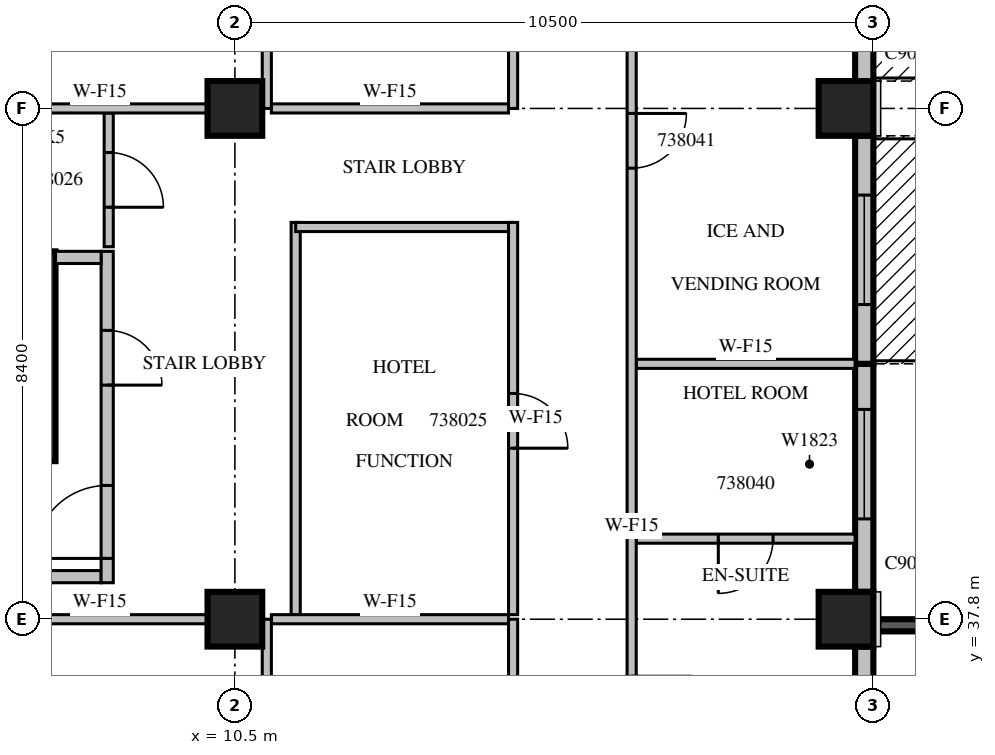
"""IFC4 building model, lengths in metres.
Left out: names, types, materials, properties, quantities, classifications, styles, units other than length and angle.
Written with IfcOpenShell. Run it as: python <this file> out.ifc"""

import sys

from ifc_helpers import new_model, si_unit, direction, frame, frame_2d, origin, origin_2d, place, context, subcontext, project, spatial, rectangle, extrude, source, transform, mapped, element, fill, save


model = new_model("IFC4")
c1 = context("Model", 3, precision=1e-05, world=origin(), true_north=direction((0.0, 1.0)))
c2 = subcontext(c1, "Body", "Model", "MODEL_VIEW")
j1 = project(units=[si_unit("LENGTHUNIT", "METRE"), si_unit("PLANEANGLEUNIT", "RADIAN")], contexts=[c1])
p1 = place(None, origin())
s1 = spatial("IfcSite", under=j1, at=p1, CompositionType="ELEMENT")
p2 = place(p1, origin())
s2 = spatial("IfcBuilding", under=s1, at=p2, CompositionType="ELEMENT")
p3 = place(p2, frame((0.0, 0.0, 177.8)))
s3 = spatial("IfcBuildingStorey", under=s2, at=p3, CompositionType="ELEMENT", Elevation=177.8)
m1 = source(origin(), c2, "Body", "SweptSolid", [
    extrude(rectangle(XDim=0.9, YDim=0.9, at=origin_2d()), origin(), (0.0, 0.0, 1.0), 3.8),
])
for number, where, z_axis, x_axis in (
    (1, (10.5, 37.8, 0.0), (0.0, 0.0, 1.0), (1.0, 0.0, 0.0)),
    (2, (20.55, 37.8, 0.0), (0.0, 0.0, 1.0), (1.0, 0.0, 0.0)),
    (3, (10.5, 46.2, 0.0), (0.0, 0.0, 1.0), (1.0, 0.0, 0.0)),
    (4, (20.55, 46.2, 0.0), (0.0, 0.0, 1.0), (1.0, 0.0, 0.0)),
):
    element("IfcColumn", number, at=place(p3, frame(where, z_axis=z_axis, x_axis=x_axis)), inside=s3, PredefinedType="COLUMN", context=c2, shape_type="MappedRepresentation", body=[
        mapped(m1, transform((0.0, 0.0, 0.0), scale=1.0)),
    ])
m2 = source(origin(), c2, "Body", "SweptSolid", [
    extrude(rectangle(XDim=7.5, YDim=0.3, at=frame_2d((3.75, 0.0))), origin(), (0.0, 0.0, 1.0), 3.4),
])
p4 = place(p3, frame((20.85, 29.85, 0.0), z_axis=(0.0, 0.0, 1.0), x_axis=(0.0, 1.0, 0.0)))
e5 = element("IfcWall", 5, at=p4, inside=s3, PredefinedType="STANDARD", context=c2, shape_type="MappedRepresentation", body=[
    mapped(m2, transform((0.0, 0.0, 0.0), scale=1.0)),
])
m3 = source(origin(), c2, "Body", "SweptSolid", [
    extrude(rectangle(XDim=1.2, YDim=2.3, at=frame_2d((0.6, 1.15))), frame((0.0, 0.16, 0.0), z_axis=(0.0, -1.0, 0.0), x_axis=(1.0, 0.0, 0.0)), (0.0, 0.0, 1.0), 0.32),
])
p5 = place(p4, frame((0.496, 0.0, 0.6)))
e6 = element("IfcOpeningElement", 6, at=p5, cuts=e5, PredefinedType="OPENING", context=c2, shape_type="MappedRepresentation", body=[
    mapped(m3, transform((0.0, 0.0, 0.0), scale=1.0)),
])
m4 = source(origin(), c2, "Body", "SweptSolid", [
    extrude(rectangle(XDim=1.0, YDim=2.1, at=frame_2d((0.5, 1.05))), frame((0.0, 0.16, 0.0), z_axis=(0.0, -1.0, 0.0), x_axis=(1.0, 0.0, 0.0)), (0.0, 0.0, 1.0), 0.32),
])
p6 = place(p4, frame((5.35, 0.0, 0.0)))
e7 = element("IfcOpeningElement", 7, at=p6, cuts=e5, PredefinedType="OPENING", context=c2, shape_type="MappedRepresentation", body=[
    mapped(m4, transform((0.0, 0.0, 0.0), scale=1.0)),
])
p7 = place(p3, frame((20.85, 38.25, 0.0), z_axis=(0.0, 0.0, 1.0), x_axis=(0.0, 1.0, 0.0)))
e8 = element("IfcWall", 8, at=p7, inside=s3, PredefinedType="STANDARD", context=c2, shape_type="SweptSolid", body=[
    extrude(rectangle(XDim=3.75, YDim=0.3, at=frame_2d((1.875, 0.0))), origin(), (0.0, 0.0, 1.0), 3.4),
])
m5 = source(origin(), c2, "Body", "SweptSolid", [
    extrude(rectangle(XDim=1.8, YDim=2.3, at=frame_2d((0.9, 1.15))), frame((0.0, 0.16, 0.0), z_axis=(0.0, -1.0, 0.0), x_axis=(1.0, 0.0, 0.0)), (0.0, 0.0, 1.0), 0.32),
])
p8 = place(p7, frame((1.2, 0.0, 0.6)))
e9 = element("IfcOpeningElement", 9, at=p8, cuts=e8, PredefinedType="OPENING", context=c2, shape_type="MappedRepresentation", body=[
    mapped(m5, transform((0.0, 0.0, 0.0), scale=1.0)),
])
m6 = source(origin(), c2, "Body", "SweptSolid", [
    extrude(rectangle(XDim=3.75, YDim=0.3, at=frame_2d((1.875, 0.0))), origin(), (0.0, 0.0, 1.0), 3.4),
])
p9 = place(p3, frame((20.85, 42.0, 0.0), z_axis=(0.0, 0.0, 1.0), x_axis=(0.0, 1.0, 0.0)))
e10 = element("IfcWall", 10, at=p9, inside=s3, PredefinedType="STANDARD", context=c2, shape_type="MappedRepresentation", body=[
    mapped(m6, transform((0.0, 0.0, 0.0), scale=1.0)),
])
m7 = source(origin(), c2, "Body", "SweptSolid", [
    extrude(rectangle(XDim=1.8, YDim=2.4, at=frame_2d((0.9, 1.2))), frame((0.0, 0.16, 0.0), z_axis=(0.0, -1.0, 0.0), x_axis=(1.0, 0.0, 0.0)), (0.0, 0.0, 1.0), 0.32),
])
p10 = place(p9, frame((0.975, 0.0, 0.0)))
e11 = element("IfcOpeningElement", 11, at=p10, cuts=e10, PredefinedType="OPENING", context=c2, shape_type="MappedRepresentation", body=[
    mapped(m7, transform((0.0, 0.0, 0.0), scale=1.0)),
])
m8 = source(origin(), c2, "Body", "SweptSolid", [
    extrude(rectangle(XDim=2.91, YDim=0.3, at=frame_2d((1.455, 0.0))), origin(), (0.0, 0.0, 1.0), 3.4),
])
p11 = place(p3, frame((20.85, 46.65, 0.0), z_axis=(0.0, 0.0, 1.0), x_axis=(0.0, 1.0, 0.0)))
e12 = element("IfcWall", 12, at=p11, inside=s3, PredefinedType="STANDARD", context=c2, shape_type="MappedRepresentation", body=[
    mapped(m8, transform((0.0, 0.0, 0.0), scale=1.0)),
])
p12 = place(p11, frame((0.555, 0.0, 0.0)))
e13 = element("IfcOpeningElement", 13, at=p12, cuts=e12, PredefinedType="OPENING", context=c2, shape_type="MappedRepresentation", body=[
    mapped(m7, transform((0.0, 0.0, 0.0), scale=1.0)),
])
m9 = source(origin(), c2, "Body", "SweptSolid", [
    extrude(rectangle(XDim=3.9, YDim=0.2, at=frame_2d((1.95, 0.0))), origin(), (0.0, 0.0, 1.0), 3.39),
])
p13 = place(p3, frame((21.0, 37.7, 0.0), z_axis=(0.0, 0.0, 1.0), x_axis=(1.0, 0.0, 0.0)))
e14 = element("IfcWall", 14, at=p13, inside=s3, PredefinedType="SOLIDWALL", context=c2, shape_type="MappedRepresentation", body=[
    mapped(m9, transform((0.0, 0.0, 0.0), scale=1.0)),
])
m10 = source(origin(), c2, "Body", "SweptSolid", [
    extrude(rectangle(XDim=2.4, YDim=2.3, at=frame_2d((1.2, 1.15))), frame((0.0, 0.11, 0.0), z_axis=(0.0, -1.0, 0.0), x_axis=(1.0, 0.0, 0.0)), (0.0, 0.0, 1.0), 0.22),
])
p14 = place(p13, frame((0.75, 0.0, 0.6)))
e15 = element("IfcOpeningElement", 15, at=p14, cuts=e14, PredefinedType="OPENING", context=c2, shape_type="MappedRepresentation", body=[
    mapped(m10, transform((0.0, 0.0, 0.0), scale=1.0)),
])
m11 = source(origin(), c2, "Body", "SweptSolid", [
    extrude(rectangle(XDim=3.45, YDim=0.25, at=frame_2d((1.725, 0.0))), origin(), (0.0, 0.0, 1.0), 3.4),
])
p15 = place(p3, frame((7.425, 40.4, 0.0), z_axis=(0.0, 0.0, 1.0), x_axis=(0.0, 1.0, 0.0)))
e16 = element("IfcWall", 16, at=p15, inside=s3, PredefinedType="SOLIDWALL", context=c2, shape_type="MappedRepresentation", body=[
    mapped(m11, transform((0.0, 0.0, 0.0), scale=1.0)),
])
p16 = place(p3, frame((6.3, 38.5, 0.0), z_axis=(0.0, 0.0, 1.0), x_axis=(1.0, 0.0, 0.0)))
e17 = element("IfcWall", 17, at=p16, inside=s3, PredefinedType="PARTITIONING", context=c2, shape_type="SweptSolid", body=[
    extrude(rectangle(XDim=2.0, YDim=0.2, at=frame_2d((1.0, 0.0))), origin(), (0.0, 0.0, 1.0), 3.4),
])
m12 = source(origin(), c2, "Body", "SweptSolid", [
    extrude(rectangle(XDim=5.45, YDim=0.2, at=frame_2d((2.725, 0.0))), origin(), (0.0, 0.0, 1.0), 3.4),
])
p17 = place(p3, frame((8.4, 38.4, 0.0), z_axis=(0.0, 0.0, 1.0), x_axis=(0.0, 1.0, 0.0)))
e18 = element("IfcWall", 18, at=p17, inside=s3, PredefinedType="PARTITIONING", context=c2, shape_type="MappedRepresentation", body=[
    mapped(m12, transform((0.0, 0.0, 0.0), scale=1.0)),
])
m13 = source(origin(), c2, "Body", "SweptSolid", [
    extrude(rectangle(XDim=1.2, YDim=2.1, at=frame_2d((0.6, 1.05))), frame((0.0, 0.11, 0.0), z_axis=(0.0, -1.0, 0.0), x_axis=(1.0, 0.0, 0.0)), (0.0, 0.0, 1.0), 0.22),
])
p18 = place(p17, frame((0.4, 0.0, 0.0)))
e19 = element("IfcOpeningElement", 19, at=p18, cuts=e18, PredefinedType="OPENING", context=c2, shape_type="MappedRepresentation", body=[
    mapped(m13, transform((0.0, 0.0, 0.0), scale=1.0)),
])
m14 = source(origin(), c2, "Body", "SweptSolid", [
    extrude(rectangle(XDim=0.9, YDim=2.1, at=frame_2d((0.45, 1.05))), frame((0.0, 0.11, 0.0), z_axis=(0.0, -1.0, 0.0), x_axis=(1.0, 0.0, 0.0)), (0.0, 0.0, 1.0), 0.22),
])
p19 = place(p17, frame((3.25, 0.0, 0.0)))
e20 = element("IfcOpeningElement", 20, at=p19, cuts=e18, PredefinedType="OPENING", context=c2, shape_type="MappedRepresentation", body=[
    mapped(m14, transform((0.0, 0.0, 0.0), scale=1.0)),
])
m15 = source(origin(), c2, "Body", "SweptSolid", [
    extrude(rectangle(XDim=0.75, YDim=0.2, at=frame_2d((0.375, 0.0))), origin(), (0.0, 0.0, 1.0), 3.4),
])
p20 = place(p3, frame((7.55, 43.75, 0.0), z_axis=(0.0, 0.0, 1.0), x_axis=(1.0, 0.0, 0.0)))
e21 = element("IfcWall", 21, at=p20, inside=s3, PredefinedType="PARTITIONING", context=c2, shape_type="MappedRepresentation", body=[
    mapped(m15, transform((0.0, 0.0, 0.0), scale=1.0)),
])
m16 = source(origin(), c2, "Body", "SweptSolid", [
    extrude(rectangle(XDim=6.45, YDim=0.15, at=frame_2d((3.225, 0.0))), origin(), (0.0, 0.0, 1.0), 3.4),
])
p21 = place(p3, frame((11.5, 44.325, 0.0), z_axis=(0.0, 0.0, 1.0), x_axis=(0.0, -1.0, 0.0)))
e22 = element("IfcWall", 22, at=p21, inside=s3, PredefinedType="PARTITIONING", context=c2, shape_type="MappedRepresentation", body=[
    mapped(m16, transform((0.0, 0.0, 0.0), scale=1.0)),
])
p22 = place(p3, frame((15.075, 44.25, 0.0), z_axis=(0.0, 0.0, 1.0), x_axis=(-1.0, 0.0, 0.0)))
e23 = element("IfcWall", 23, at=p22, inside=s3, PredefinedType="PARTITIONING", context=c2, shape_type="SweptSolid", body=[
    extrude(rectangle(XDim=3.575, YDim=0.15, at=frame_2d((1.788, 0.0))), origin(), (0.0, 0.0, 1.0), 3.4),
])
p23 = place(p3, frame((15.075, 37.875, 0.0), z_axis=(0.0, 0.0, 1.0), x_axis=(0.0, 1.0, 0.0)))
e24 = element("IfcWall", 24, at=p23, inside=s3, PredefinedType="PARTITIONING", context=c2, shape_type="MappedRepresentation", body=[
    mapped(m16, transform((0.0, 0.0, 0.0), scale=1.0)),
])
m17 = source(origin(), c2, "Body", "SweptSolid", [
    extrude(rectangle(XDim=0.9, YDim=2.1, at=frame_2d((0.45, 1.05))), frame((0.0, 0.085, 0.0), z_axis=(0.0, -1.0, 0.0), x_axis=(1.0, 0.0, 0.0)), (0.0, 0.0, 1.0), 0.17),
])
p24 = place(p23, frame((2.737, 0.0, 0.0)))
e25 = element("IfcOpeningElement", 25, at=p24, cuts=e24, PredefinedType="OPENING", context=c2, shape_type="MappedRepresentation", body=[
    mapped(m17, transform((0.0, 0.0, 0.0), scale=1.0)),
])
m18 = source(origin(), c2, "Body", "SweptSolid", [
    extrude(rectangle(XDim=2.2, YDim=0.15, at=frame_2d((1.1, 0.0))), origin(), (0.0, 0.0, 1.0), 3.4),
])
p25 = place(p3, frame((8.425, 43.925, 0.0), z_axis=(0.0, 0.0, 1.0), x_axis=(0.0, 1.0, 0.0)))
e26 = element("IfcWall", 26, at=p25, inside=s3, PredefinedType="PARTITIONING", context=c2, shape_type="MappedRepresentation", body=[
    mapped(m18, transform((0.0, 0.0, 0.0), scale=1.0)),
])
p26 = place(p25, frame((0.65, 0.0, 0.0)))
e27 = element("IfcOpeningElement", 27, at=p26, cuts=e26, PredefinedType="OPENING", context=c2, shape_type="MappedRepresentation", body=[
    mapped(m17, transform((0.0, 0.0, 0.0), scale=1.0)),
])
m19 = source(origin(), c2, "Body", "SweptSolid", [
    extrude(rectangle(XDim=3.546, YDim=0.15, at=frame_2d((1.773, 0.0))), origin(), (0.0, 0.0, 1.0), 3.4),
])
p27 = place(p3, frame((10.051, 37.8, 0.0), z_axis=(0.0, 0.0, 1.0), x_axis=(-1.0, 0.0, 0.0)))
e28 = element("IfcWall", 28, at=p27, inside=s3, PredefinedType="PARTITIONING", context=c2, shape_type="MappedRepresentation", body=[
    mapped(m19, transform((0.0, 0.0, 0.0), scale=1.0)),
])
m20 = source(origin(), c2, "Body", "SweptSolid", [
    extrude(rectangle(XDim=3.9, YDim=0.15, at=frame_2d((1.95, 0.0))), origin(), (0.0, 0.0, 1.0), 3.4),
])
p28 = place(p3, frame((15.0, 37.8, 0.0), z_axis=(0.0, 0.0, 1.0), x_axis=(-1.0, 0.0, 0.0)))
e29 = element("IfcWall", 29, at=p28, inside=s3, PredefinedType="PARTITIONING", context=c2, shape_type="MappedRepresentation", body=[
    mapped(m20, transform((0.0, 0.0, 0.0), scale=1.0)),
])
m21 = source(origin(), c2, "Body", "SweptSolid", [
    extrude(rectangle(XDim=8.4, YDim=0.15, at=frame_2d((4.2, 0.0))), origin(), (0.0, 0.0, 1.0), 3.4),
])
p29 = place(p3, frame((11.025, 29.4, 0.0), z_axis=(0.0, 0.0, 1.0), x_axis=(0.0, 1.0, 0.0)))
e30 = element("IfcWall", 30, at=p29, inside=s3, PredefinedType="PARTITIONING", context=c2, shape_type="MappedRepresentation", body=[
    mapped(m21, transform((0.0, 0.0, 0.0), scale=1.0)),
])
p30 = place(p29, frame((1.418, 0.0, 0.0)))
e31 = element("IfcOpeningElement", 31, at=p30, cuts=e30, PredefinedType="OPENING", context=c2, shape_type="MappedRepresentation", body=[
    mapped(m17, transform((0.0, 0.0, 0.0), scale=1.0)),
])
p31 = place(p29, frame((0.46, 0.0, 0.0)))
e32 = element("IfcOpeningElement", 32, at=p31, cuts=e30, PredefinedType="OPENING", context=c2, shape_type="MappedRepresentation", body=[
    mapped(m17, transform((0.0, 0.0, 0.0), scale=1.0)),
])
p32 = place(p29, frame((4.525, 0.0, 0.0)))
e33 = element("IfcOpeningElement", 33, at=p32, cuts=e30, PredefinedType="OPENING", context=c2, shape_type="MappedRepresentation", body=[
    mapped(m17, transform((0.0, 0.0, 0.0), scale=1.0)),
])
p33 = place(p29, frame((6.387, 0.0, 0.0)))
e34 = element("IfcOpeningElement", 34, at=p33, cuts=e30, PredefinedType="OPENING", context=c2, shape_type="MappedRepresentation", body=[
    mapped(m17, transform((0.0, 0.0, 0.0), scale=1.0)),
])
p34 = place(p3, frame((10.051, 46.2, 0.0), z_axis=(0.0, 0.0, 1.0), x_axis=(-1.0, 0.0, 0.0)))
e35 = element("IfcWall", 35, at=p34, inside=s3, PredefinedType="PARTITIONING", context=c2, shape_type="MappedRepresentation", body=[
    mapped(m19, transform((0.0, 0.0, 0.0), scale=1.0)),
])
p35 = place(p3, frame((15.0, 46.2, 0.0), z_axis=(0.0, 0.0, 1.0), x_axis=(-1.0, 0.0, 0.0)))
e36 = element("IfcWall", 36, at=p35, inside=s3, PredefinedType="PARTITIONING", context=c2, shape_type="MappedRepresentation", body=[
    mapped(m20, transform((0.0, 0.0, 0.0), scale=1.0)),
])
p36 = place(p3, frame((11.025, 46.2, 0.0), z_axis=(0.0, 0.0, 1.0), x_axis=(0.0, 1.0, 0.0)))
e37 = element("IfcWall", 37, at=p36, inside=s3, PredefinedType="PARTITIONING", context=c2, shape_type="SweptSolid", body=[
    extrude(rectangle(XDim=7.26, YDim=0.15, at=frame_2d((3.63, 0.0))), origin(), (0.0, 0.0, 1.0), 3.4),
])
m22 = source(origin(), c2, "Body", "SweptSolid", [
    extrude(rectangle(XDim=1.6, YDim=2.1, at=frame_2d((0.8, 1.05))), frame((0.0, 0.085, 0.0), z_axis=(0.0, -1.0, 0.0), x_axis=(1.0, 0.0, 0.0)), (0.0, 0.0, 1.0), 0.17),
])
p37 = place(p36, frame((1.194, 0.0, 0.0)))
e38 = element("IfcOpeningElement", 38, at=p37, cuts=e37, PredefinedType="OPENING", context=c2, shape_type="MappedRepresentation", body=[
    mapped(m22, transform((0.0, 0.0, 0.0), scale=1.0)),
])
m23 = source(origin(), c2, "Body", "SweptSolid", [
    extrude(rectangle(XDim=1.0, YDim=2.1, at=frame_2d((0.5, 1.05))), frame((0.0, 0.085, 0.0), z_axis=(0.0, -1.0, 0.0), x_axis=(1.0, 0.0, 0.0)), (0.0, 0.0, 1.0), 0.17),
])
p38 = place(p36, frame((4.009, 0.0, 0.0)))
e39 = element("IfcOpeningElement", 39, at=p38, cuts=e37, PredefinedType="OPENING", context=c2, shape_type="MappedRepresentation", body=[
    mapped(m23, transform((0.0, 0.0, 0.0), scale=1.0)),
])
m24 = source(origin(), c2, "Body", "SweptSolid", [
    extrude(rectangle(XDim=3.6, YDim=0.15, at=frame_2d((1.8, 0.0))), origin(), (0.0, 0.0, 1.0), 3.4),
])
p39 = place(p3, frame((17.1, 39.125, 0.0), z_axis=(0.0, 0.0, 1.0), x_axis=(1.0, 0.0, 0.0)))
e40 = element("IfcWall", 40, at=p39, inside=s3, PredefinedType="PARTITIONING", context=c2, shape_type="MappedRepresentation", body=[
    mapped(m24, transform((0.0, 0.0, 0.0), scale=1.0)),
])
p40 = place(p39, frame((1.35, 0.0, 0.0)))
e41 = element("IfcOpeningElement", 41, at=p40, cuts=e40, PredefinedType="OPENING", context=c2, shape_type="MappedRepresentation", body=[
    mapped(m17, transform((0.0, 0.0, 0.0), scale=1.0)),
])
p41 = place(p3, frame((20.7, 42.0, 0.0), z_axis=(0.0, 0.0, 1.0), x_axis=(-1.0, 0.0, 0.0)))
e42 = element("IfcWall", 42, at=p41, inside=s3, PredefinedType="PARTITIONING", context=c2, shape_type="MappedRepresentation", body=[
    mapped(m24, transform((0.0, 0.0, 0.0), scale=1.0)),
])
p42 = place(p3, frame((15.075, 29.4, 0.0), z_axis=(0.0, 0.0, 1.0), x_axis=(0.0, 1.0, 0.0)))
e43 = element("IfcWall", 43, at=p42, inside=s3, PredefinedType="PARTITIONING", context=c2, shape_type="MappedRepresentation", body=[
    mapped(m21, transform((0.0, 0.0, 0.0), scale=1.0)),
])
m25 = source(origin(), c2, "Body", "SweptSolid", [
    extrude(rectangle(XDim=1.2, YDim=2.1, at=frame_2d((0.6, 1.05))), frame((0.0, 0.085, 0.0), z_axis=(0.0, -1.0, 0.0), x_axis=(1.0, 0.0, 0.0)), (0.0, 0.0, 1.0), 0.17),
])
p43 = place(p42, frame((1.03, 0.0, 0.0)))
e44 = element("IfcOpeningElement", 44, at=p43, cuts=e43, PredefinedType="OPENING", context=c2, shape_type="MappedRepresentation", body=[
    mapped(m25, transform((0.0, 0.0, 0.0), scale=1.0)),
])
m26 = source(origin(), c2, "Body", "SweptSolid", [
    extrude(rectangle(XDim=7.26, YDim=0.15, at=frame_2d((3.63, 0.0))), origin(), (0.0, 0.0, 1.0), 3.4),
])
p44 = place(p3, frame((15.075, 46.2, 0.0), z_axis=(0.0, 0.0, 1.0), x_axis=(0.0, 1.0, 0.0)))
e45 = element("IfcWall", 45, at=p44, inside=s3, PredefinedType="PARTITIONING", context=c2, shape_type="MappedRepresentation", body=[
    mapped(m26, transform((0.0, 0.0, 0.0), scale=1.0)),
])
p45 = place(p44, frame((0.956, 0.0, 0.0)))
e46 = element("IfcOpeningElement", 46, at=p45, cuts=e45, PredefinedType="OPENING", context=c2, shape_type="SweptSolid", body=[
    extrude(rectangle(XDim=1.6, YDim=2.1, at=frame_2d((0.8, 1.05))), frame((0.0, 0.085, 0.0), z_axis=(0.0, -1.0, 0.0), x_axis=(1.0, 0.0, 0.0)), (0.0, 0.0, 1.0), 0.17),
])
p46 = place(p44, frame((4.025, 0.0, 0.0)))
e47 = element("IfcOpeningElement", 47, at=p46, cuts=e45, PredefinedType="OPENING", context=c2, shape_type="MappedRepresentation", body=[
    mapped(m17, transform((0.0, 0.0, 0.0), scale=1.0)),
])
p47 = place(p3, frame((17.025, 49.26, 0.0), z_axis=(0.0, 0.0, 1.0), x_axis=(0.0, -1.0, 0.0)))
e48 = element("IfcWall", 48, at=p47, inside=s3, PredefinedType="PARTITIONING", context=c2, shape_type="SweptSolid", body=[
    extrude(rectangle(XDim=19.86, YDim=0.15, at=frame_2d((9.93, 0.0))), origin(), (0.0, 0.0, 1.0), 3.4),
])
p48 = place(p47, frame((18.076, 0.0, 0.0)))
e49 = element("IfcOpeningElement", 49, at=p48, cuts=e48, PredefinedType="OPENING", context=c2, shape_type="MappedRepresentation", body=[
    mapped(m17, transform((0.0, 0.0, 0.0), scale=1.0)),
])
p49 = place(p47, frame((15.976, 0.0, 0.0)))
e50 = element("IfcOpeningElement", 50, at=p49, cuts=e48, PredefinedType="OPENING", context=c2, shape_type="MappedRepresentation", body=[
    mapped(m17, transform((0.0, 0.0, 0.0), scale=1.0)),
])
p50 = place(p47, frame((12.398, 0.0, 0.0)))
e51 = element("IfcOpeningElement", 51, at=p50, cuts=e48, PredefinedType="OPENING", context=c2, shape_type="MappedRepresentation", body=[
    mapped(m23, transform((0.0, 0.0, 0.0), scale=1.0)),
])
p51 = place(p47, frame((3.143, 0.0, 0.0)))
e52 = element("IfcOpeningElement", 52, at=p51, cuts=e48, PredefinedType="OPENING", context=c2, shape_type="MappedRepresentation", body=[
    mapped(m17, transform((0.0, 0.0, 0.0), scale=1.0)),
])
m27 = source(origin(), c2, "Body", "SweptSolid", [
    extrude(rectangle(XDim=1.8, YDim=2.3, at=frame_2d((0.9, 1.15))), frame((0.0, 0.03, 0.0), z_axis=(0.0, -1.0, 0.0), x_axis=(1.0, 0.0, 0.0)), (0.0, 0.0, 1.0), 0.06),
])
p52 = place(p8, origin())
e53 = element("IfcWindow", 53, at=p52, inside=s3, PartitioningType="SINGLE_PANEL", PredefinedType="WINDOW", context=c2, shape_type="MappedRepresentation", body=[
    mapped(m27, transform((0.0, 0.0, 0.0), scale=1.0)),
])
fill(e9, e53)
m28 = source(origin(), c2, "Body", "SweptSolid", [
    extrude(rectangle(XDim=1.8, YDim=2.4, at=frame_2d((0.9, 1.2))), frame((0.0, 0.025, 0.0), z_axis=(0.0, -1.0, 0.0), x_axis=(1.0, 0.0, 0.0)), (0.0, 0.0, 1.0), 0.05),
])
p53 = place(p10, origin())
e54 = element("IfcDoor", 54, at=p53, inside=s3, OperationType="SLIDING_TO_LEFT", PredefinedType="DOOR", context=c2, shape_type="MappedRepresentation", body=[
    mapped(m28, transform((0.0, 0.0, 0.0), scale=1.0)),
])
fill(e11, e54)
m29 = source(origin(), c2, "Body", "SweptSolid", [
    extrude(rectangle(XDim=1.2, YDim=2.1, at=frame_2d((0.6, 1.05))), frame((0.0, 0.025, 0.0), z_axis=(0.0, -1.0, 0.0), x_axis=(1.0, 0.0, 0.0)), (0.0, 0.0, 1.0), 0.05),
])
p54 = place(p18, origin())
e55 = element("IfcDoor", 55, at=p54, inside=s3, OperationType="SINGLE_SWING_LEFT", PredefinedType="DOOR", context=c2, shape_type="MappedRepresentation", body=[
    mapped(m29, transform((0.0, 0.0, 0.0), scale=1.0)),
])
fill(e19, e55)
m30 = source(origin(), c2, "Body", "SweptSolid", [
    extrude(rectangle(XDim=0.9, YDim=2.1, at=frame_2d((0.45, 1.05))), frame((0.0, 0.025, 0.0), z_axis=(0.0, -1.0, 0.0), x_axis=(1.0, 0.0, 0.0)), (0.0, 0.0, 1.0), 0.05),
])
p55 = place(p19, origin())
e56 = element("IfcDoor", 56, at=p55, inside=s3, OperationType="SINGLE_SWING_RIGHT", PredefinedType="DOOR", context=c2, shape_type="MappedRepresentation", body=[
    mapped(m30, transform((0.0, 0.0, 0.0), scale=1.0)),
])
fill(e20, e56)
p56 = place(p24, origin())
e57 = element("IfcDoor", 57, at=p56, inside=s3, OperationType="SINGLE_SWING_RIGHT", PredefinedType="DOOR", context=c2, shape_type="MappedRepresentation", body=[
    mapped(m30, transform((0.0, 0.0, 0.0), scale=1.0)),
])
fill(e25, e57)
p57 = place(p26, origin())
e58 = element("IfcDoor", 58, at=p57, inside=s3, OperationType="SINGLE_SWING_RIGHT", PredefinedType="DOOR", context=c2, shape_type="MappedRepresentation", body=[
    mapped(m30, transform((0.0, 0.0, 0.0), scale=1.0)),
])
fill(e27, e58)
p58 = place(p40, origin())
e59 = element("IfcDoor", 59, at=p58, inside=s3, OperationType="SINGLE_SWING_RIGHT", PredefinedType="DOOR", context=c2, shape_type="MappedRepresentation", body=[
    mapped(m30, transform((0.0, 0.0, 0.0), scale=1.0)),
])
fill(e41, e59)
p59 = place(p51, origin())
e60 = element("IfcDoor", 60, at=p59, inside=s3, OperationType="SINGLE_SWING_LEFT", PredefinedType="DOOR", context=c2, shape_type="MappedRepresentation", body=[
    mapped(m30, transform((0.0, 0.0, 0.0), scale=1.0)),
])
fill(e52, e60)
save(model, sys.argv[1])
